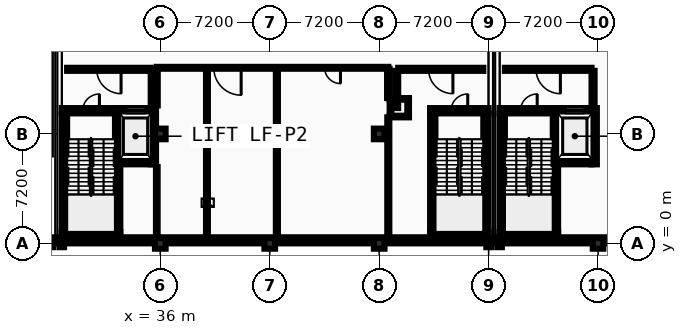
"""IFC4 building model, lengths in metres.
Left out: names, types, materials, properties, quantities, classifications, styles, units other than length and angle.
Written with IfcOpenShell. Run it as: python <this file> out.ifc"""

import sys

from ifc_helpers import new_model, si_unit, direction, frame, frame_2d, origin, origin_2d, place, context, subcontext, project, spatial, rectangle, i_section, extrude, element, fill, save


model = new_model("IFC4")
c1 = context("Model", 3, precision=1e-05, world=origin(), true_north=direction((0.0, 1.0)))
c2 = subcontext(c1, "Body", "Model", "MODEL_VIEW")
j1 = project(units=[si_unit("LENGTHUNIT", "METRE"), si_unit("PLANEANGLEUNIT", "RADIAN")], contexts=[c1])
p1 = place(None, origin())
s1 = spatial("IfcSite", under=j1, at=p1, CompositionType="ELEMENT")
p2 = place(p1, origin())
s2 = spatial("IfcBuilding", under=s1, at=p2, CompositionType="ELEMENT")
p3 = place(p2, frame((0.0, 0.0, -4.8)))
s3 = spatial("IfcBuildingStorey", under=s2, at=p3, CompositionType="ELEMENT", Elevation=-4.8)
for number, where, z_axis, x_axis in (
    (1, (28.8, 0.0, 0.0), (0.0, 0.0, 1.0), (1.0, 0.0, 0.0)),
    (2, (29.52, 0.0, 0.0), (0.0, 0.0, 1.0), (1.0, 0.0, 0.0)),
):
    element("IfcColumn", number, at=place(p3, frame(where, z_axis=z_axis, x_axis=x_axis)), inside=s3, PredefinedType="COLUMN", context=c2, shape_type="SweptSolid", body=[
        extrude(i_section(OverallWidth=0.3, OverallDepth=0.5, WebThickness=0.014, FlangeThickness=0.028, FilletRadius=0.027, at=origin_2d()), origin(), (0.0, 0.0, 1.0), 4.8),
    ])
for number, where, z_axis, x_axis in (
    (3, (36.0, 0.0, 0.0), (0.0, 0.0, 1.0), (1.0, 0.0, 0.0)),
    (4, (36.0, 7.2, 0.0), (0.0, 0.0, 1.0), (1.0, 0.0, 0.0)),
    (5, (43.2, 0.0, 0.0), (0.0, 0.0, 1.0), (1.0, 0.0, 0.0)),
    (6, (43.2, 7.2, 0.0), (0.0, 0.0, 1.0), (1.0, 0.0, 0.0)),
    (7, (50.4, 0.0, 0.0), (0.0, 0.0, 1.0), (1.0, 0.0, 0.0)),
    (8, (50.4, 7.2, 0.0), (0.0, 0.0, 1.0), (1.0, 0.0, 0.0)),
):
    element("IfcColumn", number, at=place(p3, frame(where, z_axis=z_axis, x_axis=x_axis)), inside=s3, PredefinedType="COLUMN", context=c2, shape_type="SweptSolid", body=[
        extrude(rectangle(XDim=0.7, YDim=0.7, at=origin_2d()), origin(), (0.0, 0.0, 1.0), 4.8),
    ])
for number, where, z_axis, x_axis in (
    (9, (57.6, 0.0, 0.0), (0.0, 0.0, 1.0), (1.0, 0.0, 0.0)),
    (10, (58.32, 0.0, 0.0), (0.0, 0.0, 1.0), (1.0, 0.0, 0.0)),
):
    element("IfcColumn", number, at=place(p3, frame(where, z_axis=z_axis, x_axis=x_axis)), inside=s3, PredefinedType="COLUMN", context=c2, shape_type="SweptSolid", body=[
        extrude(i_section(OverallWidth=0.3, OverallDepth=0.5, WebThickness=0.014, FlangeThickness=0.028, FilletRadius=0.027, at=origin_2d()), origin(), (0.0, 0.0, 1.0), 4.8),
    ])
p4 = place(p3, frame((64.8, 0.0, 0.0), z_axis=(0.0, 0.0, 1.0), x_axis=(1.0, 0.0, 0.0)))
e11 = element("IfcColumn", 11, at=p4, inside=s3, PredefinedType="COLUMN", context=c2, shape_type="SweptSolid", body=[
    extrude(rectangle(XDim=0.7, YDim=0.7, at=origin_2d()), origin(), (0.0, 0.0, 1.0), 4.8),
])
p5 = place(p3, frame((0.0, 0.2, 0.0), z_axis=(0.0, 0.0, 1.0), x_axis=(1.0, 0.0, 0.0)))
e12 = element("IfcWall", 12, at=p5, inside=s3, PredefinedType="USERDEFINED", context=c2, shape_type="SweptSolid", body=[
    extrude(rectangle(XDim=86.4, YDim=0.4, at=frame_2d((43.2, 0.0))), origin(), (0.0, 0.0, 1.0), 4.545),
])
p6 = place(p3, frame((29.52, 0.575, 0.0), z_axis=(0.0, 0.0, 1.0), x_axis=(1.0, 0.0, 0.0)))
e13 = element("IfcWall", 13, at=p6, inside=s3, PredefinedType="SHEAR", context=c2, shape_type="SweptSolid", body=[
    extrude(rectangle(XDim=3.85, YDim=0.35, at=frame_2d((1.925, 0.0))), origin(), (0.0, 0.0, 1.0), 4.545),
])
p7 = place(p3, frame((29.52, 8.725, 0.0), z_axis=(0.0, 0.0, 1.0), x_axis=(1.0, 0.0, 0.0)))
e14 = element("IfcWall", 14, at=p7, inside=s3, PredefinedType="SHEAR", context=c2, shape_type="SweptSolid", body=[
    extrude(rectangle(XDim=3.85, YDim=0.35, at=frame_2d((1.925, 0.0))), origin(), (0.0, 0.0, 1.0), 4.545),
])
p8 = place(p7, frame((1.375, 0.0, 0.0)))
e15 = element("IfcOpeningElement", 15, at=p8, cuts=e14, PredefinedType="OPENING", context=c2, shape_type="SweptSolid", body=[
    extrude(rectangle(XDim=1.1, YDim=2.15, at=frame_2d((0.55, 1.075))), frame((0.0, 0.185, 0.0), z_axis=(0.0, -1.0, 0.0), x_axis=(1.0, 0.0, 0.0)), (0.0, 0.0, 1.0), 0.37),
])
for number, where, z_axis, x_axis in (
    (16, (29.695, 0.75, 0.0), (0.0, 0.0, 1.0), (0.0, 1.0, 0.0)),
    (17, (33.195, 0.75, 0.0), (0.0, 0.0, 1.0), (0.0, 1.0, 0.0)),
):
    element("IfcWall", number, at=place(p3, frame(where, z_axis=z_axis, x_axis=x_axis)), inside=s3, PredefinedType="SHEAR", context=c2, shape_type="SweptSolid", body=[
        extrude(rectangle(XDim=7.8, YDim=0.35, at=frame_2d((3.9, 0.0))), origin(), (0.0, 0.0, 1.0), 4.545),
    ])
p9 = place(p3, frame((33.37, 5.375, 0.0), z_axis=(0.0, 0.0, 1.0), x_axis=(1.0, 0.0, 0.0)))
e18 = element("IfcWall", 18, at=p9, inside=s3, PredefinedType="SHEAR", context=c2, shape_type="SweptSolid", body=[
    extrude(rectangle(XDim=2.0, YDim=0.35, at=frame_2d((1.0, 0.0))), origin(), (0.0, 0.0, 1.0), 4.545),
])
p10 = place(p3, frame((33.37, 8.725, 0.0), z_axis=(0.0, 0.0, 1.0), x_axis=(1.0, 0.0, 0.0)))
e19 = element("IfcWall", 19, at=p10, inside=s3, PredefinedType="SHEAR", context=c2, shape_type="SweptSolid", body=[
    extrude(rectangle(XDim=2.0, YDim=0.35, at=frame_2d((1.0, 0.0))), origin(), (0.0, 0.0, 1.0), 4.545),
])
p11 = place(p10, frame((0.4, 0.0, 0.0)))
e20 = element("IfcOpeningElement", 20, at=p11, cuts=e19, PredefinedType="OPENING", context=c2, shape_type="SweptSolid", body=[
    extrude(rectangle(XDim=1.2, YDim=2.2, at=frame_2d((0.6, 1.1))), frame((0.0, 0.185, 0.0), z_axis=(0.0, -1.0, 0.0), x_axis=(1.0, 0.0, 0.0)), (0.0, 0.0, 1.0), 0.37),
])
p12 = place(p3, frame((35.545, 5.2, 0.0), z_axis=(0.0, 0.0, 1.0), x_axis=(0.0, 1.0, 0.0)))
e21 = element("IfcWall", 21, at=p12, inside=s3, PredefinedType="SHEAR", context=c2, shape_type="SweptSolid", body=[
    extrude(rectangle(XDim=3.7, YDim=0.35, at=frame_2d((1.85, 0.0))), origin(), (0.0, 0.0, 1.0), 4.545),
])
p13 = place(p3, frame((29.87, 11.45, 0.0), z_axis=(0.0, 0.0, 1.0), x_axis=(1.0, 0.0, 0.0)))
e22 = element("IfcWall", 22, at=p13, inside=s3, PredefinedType="PARTITIONING", context=c2, shape_type="SweptSolid", body=[
    extrude(rectangle(XDim=5.5, YDim=0.2, at=frame_2d((2.75, 0.0))), origin(), (0.0, 0.0, 1.0), 4.545),
])
p14 = place(p13, frame((1.95, 0.0, 0.0)))
e23 = element("IfcOpeningElement", 23, at=p14, cuts=e22, PredefinedType="OPENING", context=c2, shape_type="SweptSolid", body=[
    extrude(rectangle(XDim=1.6, YDim=2.2, at=frame_2d((0.8, 1.1))), frame((0.0, 0.11, 0.0), z_axis=(0.0, -1.0, 0.0), x_axis=(1.0, 0.0, 0.0)), (0.0, 0.0, 1.0), 0.22),
])
p15 = place(p3, frame((35.47, 8.9, 0.0), z_axis=(0.0, 0.0, 1.0), x_axis=(0.0, 1.0, 0.0)))
e24 = element("IfcWall", 24, at=p15, inside=s3, PredefinedType="PARTITIONING", context=c2, shape_type="SweptSolid", body=[
    extrude(rectangle(XDim=2.45, YDim=0.2, at=frame_2d((1.225, 0.0))), origin(), (0.0, 0.0, 1.0), 4.545),
])
p16 = place(p3, frame((53.75, 0.575, 0.0), z_axis=(0.0, 0.0, 1.0), x_axis=(1.0, 0.0, 0.0)))
e25 = element("IfcWall", 25, at=p16, inside=s3, PredefinedType="SHEAR", context=c2, shape_type="SweptSolid", body=[
    extrude(rectangle(XDim=3.85, YDim=0.35, at=frame_2d((1.925, 0.0))), origin(), (0.0, 0.0, 1.0), 4.545),
])
p17 = place(p3, frame((53.75, 8.725, 0.0), z_axis=(0.0, 0.0, 1.0), x_axis=(1.0, 0.0, 0.0)))
e26 = element("IfcWall", 26, at=p17, inside=s3, PredefinedType="SHEAR", context=c2, shape_type="SweptSolid", body=[
    extrude(rectangle(XDim=3.85, YDim=0.35, at=frame_2d((1.925, 0.0))), origin(), (0.0, 0.0, 1.0), 4.545),
])
p18 = place(p17, frame((1.375, 0.0, 0.0)))
e27 = element("IfcOpeningElement", 27, at=p18, cuts=e26, PredefinedType="OPENING", context=c2, shape_type="SweptSolid", body=[
    extrude(rectangle(XDim=1.1, YDim=2.15, at=frame_2d((0.55, 1.075))), frame((0.0, 0.185, 0.0), z_axis=(0.0, -1.0, 0.0), x_axis=(1.0, 0.0, 0.0)), (0.0, 0.0, 1.0), 0.37),
])
for number, where, z_axis, x_axis in (
    (28, (53.925, 0.75, 0.0), (0.0, 0.0, 1.0), (0.0, 1.0, 0.0)),
    (29, (57.425, 0.75, 0.0), (0.0, 0.0, 1.0), (0.0, 1.0, 0.0)),
):
    element("IfcWall", number, at=place(p3, frame(where, z_axis=z_axis, x_axis=x_axis)), inside=s3, PredefinedType="SHEAR", context=c2, shape_type="SweptSolid", body=[
        extrude(rectangle(XDim=7.8, YDim=0.35, at=frame_2d((3.9, 0.0))), origin(), (0.0, 0.0, 1.0), 4.545),
    ])
p19 = place(p3, frame((51.65, 11.45, 0.0), z_axis=(0.0, 0.0, 1.0), x_axis=(1.0, 0.0, 0.0)))
e30 = element("IfcWall", 30, at=p19, inside=s3, PredefinedType="PARTITIONING", context=c2, shape_type="SweptSolid", body=[
    extrude(rectangle(XDim=5.6, YDim=0.2, at=frame_2d((2.8, 0.0))), origin(), (0.0, 0.0, 1.0), 4.545),
])
p20 = place(p19, frame((2.0, 0.0, 0.0)))
e31 = element("IfcOpeningElement", 31, at=p20, cuts=e30, PredefinedType="OPENING", context=c2, shape_type="SweptSolid", body=[
    extrude(rectangle(XDim=1.6, YDim=2.2, at=frame_2d((0.8, 1.1))), frame((0.0, 0.11, 0.0), z_axis=(0.0, -1.0, 0.0), x_axis=(1.0, 0.0, 0.0)), (0.0, 0.0, 1.0), 0.22),
])
p21 = place(p3, frame((51.55, 8.9, 0.0), z_axis=(0.0, 0.0, 1.0), x_axis=(0.0, 1.0, 0.0)))
e32 = element("IfcWall", 32, at=p21, inside=s3, PredefinedType="PARTITIONING", context=c2, shape_type="SweptSolid", body=[
    extrude(rectangle(XDim=2.45, YDim=0.2, at=frame_2d((1.225, 0.0))), origin(), (0.0, 0.0, 1.0), 4.545),
])
p22 = place(p3, frame((58.32, 0.575, 0.0), z_axis=(0.0, 0.0, 1.0), x_axis=(1.0, 0.0, 0.0)))
e33 = element("IfcWall", 33, at=p22, inside=s3, PredefinedType="SHEAR", context=c2, shape_type="SweptSolid", body=[
    extrude(rectangle(XDim=3.85, YDim=0.35, at=frame_2d((1.925, 0.0))), origin(), (0.0, 0.0, 1.0), 4.545),
])
p23 = place(p3, frame((58.32, 8.725, 0.0), z_axis=(0.0, 0.0, 1.0), x_axis=(1.0, 0.0, 0.0)))
e34 = element("IfcWall", 34, at=p23, inside=s3, PredefinedType="SHEAR", context=c2, shape_type="SweptSolid", body=[
    extrude(rectangle(XDim=3.85, YDim=0.35, at=frame_2d((1.925, 0.0))), origin(), (0.0, 0.0, 1.0), 4.545),
])
p24 = place(p23, frame((1.375, 0.0, 0.0)))
e35 = element("IfcOpeningElement", 35, at=p24, cuts=e34, PredefinedType="OPENING", context=c2, shape_type="SweptSolid", body=[
    extrude(rectangle(XDim=1.1, YDim=2.15, at=frame_2d((0.55, 1.075))), frame((0.0, 0.185, 0.0), z_axis=(0.0, -1.0, 0.0), x_axis=(1.0, 0.0, 0.0)), (0.0, 0.0, 1.0), 0.37),
])
for number, where, z_axis, x_axis in (
    (36, (58.495, 0.75, 0.0), (0.0, 0.0, 1.0), (0.0, 1.0, 0.0)),
    (37, (61.995, 0.75, 0.0), (0.0, 0.0, 1.0), (0.0, 1.0, 0.0)),
):
    element("IfcWall", number, at=place(p3, frame(where, z_axis=z_axis, x_axis=x_axis)), inside=s3, PredefinedType="SHEAR", context=c2, shape_type="SweptSolid", body=[
        extrude(rectangle(XDim=7.8, YDim=0.35, at=frame_2d((3.9, 0.0))), origin(), (0.0, 0.0, 1.0), 4.545),
    ])
p25 = place(p3, frame((62.17, 5.375, 0.0), z_axis=(0.0, 0.0, 1.0), x_axis=(1.0, 0.0, 0.0)))
e38 = element("IfcWall", 38, at=p25, inside=s3, PredefinedType="SHEAR", context=c2, shape_type="SweptSolid", body=[
    extrude(rectangle(XDim=2.2, YDim=0.35, at=frame_2d((1.1, 0.0))), origin(), (0.0, 0.0, 1.0), 4.545),
])
p26 = place(p3, frame((62.17, 8.725, 0.0), z_axis=(0.0, 0.0, 1.0), x_axis=(1.0, 0.0, 0.0)))
e39 = element("IfcWall", 39, at=p26, inside=s3, PredefinedType="SHEAR", context=c2, shape_type="SweptSolid", body=[
    extrude(rectangle(XDim=2.2, YDim=0.35, at=frame_2d((1.1, 0.0))), origin(), (0.0, 0.0, 1.0), 4.545),
])
p27 = place(p26, frame((0.5, 0.0, 0.0)))
e40 = element("IfcOpeningElement", 40, at=p27, cuts=e39, PredefinedType="OPENING", context=c2, shape_type="SweptSolid", body=[
    extrude(rectangle(XDim=1.2, YDim=2.2, at=frame_2d((0.6, 1.1))), frame((0.0, 0.185, 0.0), z_axis=(0.0, -1.0, 0.0), x_axis=(1.0, 0.0, 0.0)), (0.0, 0.0, 1.0), 0.37),
])
p28 = place(p3, frame((64.545, 5.2, 0.0), z_axis=(0.0, 0.0, 1.0), x_axis=(0.0, 1.0, 0.0)))
e41 = element("IfcWall", 41, at=p28, inside=s3, PredefinedType="SHEAR", context=c2, shape_type="SweptSolid", body=[
    extrude(rectangle(XDim=3.7, YDim=0.35, at=frame_2d((1.85, 0.0))), origin(), (0.0, 0.0, 1.0), 4.545),
])
p29 = place(p3, frame((58.67, 11.45, 0.0), z_axis=(0.0, 0.0, 1.0), x_axis=(1.0, 0.0, 0.0)))
e42 = element("IfcWall", 42, at=p29, inside=s3, PredefinedType="PARTITIONING", context=c2, shape_type="SweptSolid", body=[
    extrude(rectangle(XDim=5.7, YDim=0.2, at=frame_2d((2.85, 0.0))), origin(), (0.0, 0.0, 1.0), 4.545),
])
p30 = place(p29, frame((2.05, 0.0, 0.0)))
e43 = element("IfcOpeningElement", 43, at=p30, cuts=e42, PredefinedType="OPENING", context=c2, shape_type="SweptSolid", body=[
    extrude(rectangle(XDim=1.6, YDim=2.2, at=frame_2d((0.8, 1.1))), frame((0.0, 0.11, 0.0), z_axis=(0.0, -1.0, 0.0), x_axis=(1.0, 0.0, 0.0)), (0.0, 0.0, 1.0), 0.22),
])
p31 = place(p3, frame((64.47, 8.9, 0.0), z_axis=(0.0, 0.0, 1.0), x_axis=(0.0, 1.0, 0.0)))
e44 = element("IfcWall", 44, at=p31, inside=s3, PredefinedType="PARTITIONING", context=c2, shape_type="SweptSolid", body=[
    extrude(rectangle(XDim=2.45, YDim=0.2, at=frame_2d((1.225, 0.0))), origin(), (0.0, 0.0, 1.0), 4.545),
])
for number, where, z_axis, x_axis in (
    (45, (51.09, 8.345, 0.0), (0.0, 0.0, 1.0), (1.0, 0.0, 0.0)),
    (46, (51.09, 9.505, 0.0), (0.0, 0.0, 1.0), (1.0, 0.0, 0.0)),
):
    element("IfcWall", number, at=place(p3, frame(where, z_axis=z_axis, x_axis=x_axis)), inside=s3, PredefinedType="PARTITIONING", context=c2, shape_type="SweptSolid", body=[
        extrude(rectangle(XDim=1.27, YDim=0.11, at=frame_2d((0.635, 0.0))), origin(), (0.0, 0.0, 1.0), 4.54),
    ])
for number, where, z_axis, x_axis in (
    (47, (51.145, 8.4, 0.0), (0.0, 0.0, 1.0), (0.0, 1.0, 0.0)),
    (48, (52.305, 8.4, 0.0), (0.0, 0.0, 1.0), (0.0, 1.0, 0.0)),
):
    element("IfcWall", number, at=place(p3, frame(where, z_axis=z_axis, x_axis=x_axis)), inside=s3, PredefinedType="PARTITIONING", context=c2, shape_type="SweptSolid", body=[
        extrude(rectangle(XDim=1.05, YDim=0.11, at=frame_2d((0.525, 0.0))), origin(), (0.0, 0.0, 1.0), 4.54),
    ])
p32 = place(p3, frame((35.77, 11.55, 0.0), z_axis=(0.0, 0.0, 1.0), x_axis=(1.0, 0.0, 0.0)))
e49 = element("IfcWall", 49, at=p32, inside=s3, PredefinedType="PARTITIONING", context=c2, shape_type="SweptSolid", body=[
    extrude(rectangle(XDim=15.23, YDim=0.125, at=frame_2d((7.615, 0.0))), origin(), (0.0, 0.0, 1.0), 4.545),
])
p33 = place(p32, frame((1.85, 0.0, 0.0)))
e50 = element("IfcOpeningElement", 50, at=p33, cuts=e49, PredefinedType="OPENING", context=c2, shape_type="SweptSolid", body=[
    extrude(rectangle(XDim=1.0, YDim=2.1, at=frame_2d((0.5, 1.05))), frame((0.0, 0.073, 0.0), z_axis=(0.0, -1.0, 0.0), x_axis=(1.0, 0.0, 0.0)), (0.0, 0.0, 1.0), 0.145),
])
p34 = place(p32, frame((3.75, 0.0, 0.0)))
e51 = element("IfcOpeningElement", 51, at=p34, cuts=e49, PredefinedType="OPENING", context=c2, shape_type="SweptSolid", body=[
    extrude(rectangle(XDim=1.8, YDim=2.3, at=frame_2d((0.9, 1.15))), frame((0.0, 0.073, 0.0), z_axis=(0.0, -1.0, 0.0), x_axis=(1.0, 0.0, 0.0)), (0.0, 0.0, 1.0), 0.145),
])
p35 = place(p32, frame((11.047, 0.0, 0.0)))
e52 = element("IfcOpeningElement", 52, at=p35, cuts=e49, PredefinedType="OPENING", context=c2, shape_type="SweptSolid", body=[
    extrude(rectangle(XDim=1.036, YDim=2.04, at=frame_2d((0.518, 1.02))), frame((0.0, 0.073, 0.0), z_axis=(0.0, -1.0, 0.0), x_axis=(1.0, 0.0, 0.0)), (0.0, 0.0, 1.0), 0.145),
])
p36 = place(p3, frame((35.77, 0.4, 0.0), z_axis=(0.0, 0.0, 1.0), x_axis=(0.0, 1.0, 0.0)))
e53 = element("IfcWall", 53, at=p36, inside=s3, PredefinedType="PARTITIONING", context=c2, shape_type="SweptSolid", body=[
    extrude(rectangle(XDim=4.625, YDim=0.11, at=frame_2d((2.312, 0.0))), origin(), (0.0, 0.0, 1.0), 4.245),
])
p37 = place(p3, frame((35.77, 9.075, 0.0), z_axis=(0.0, 0.0, 1.0), x_axis=(0.0, 1.0, 0.0)))
e54 = element("IfcWall", 54, at=p37, inside=s3, PredefinedType="PARTITIONING", context=c2, shape_type="SweptSolid", body=[
    extrude(rectangle(XDim=2.413, YDim=0.125, at=frame_2d((1.206, 0.0))), origin(), (0.0, 0.0, 1.0), 4.245),
])
p38 = place(p3, frame((39.07, 0.4, 0.0), z_axis=(0.0, 0.0, 1.0), x_axis=(0.0, 1.0, 0.0)))
e55 = element("IfcWall", 55, at=p38, inside=s3, PredefinedType="PARTITIONING", context=c2, shape_type="SweptSolid", body=[
    extrude(rectangle(XDim=11.088, YDim=0.125, at=frame_2d((5.544, 0.0))), origin(), (0.0, 0.0, 1.0), 4.545),
])
p39 = place(p3, frame((43.67, 0.4, 0.0), z_axis=(0.0, 0.0, 1.0), x_axis=(0.0, 1.0, 0.0)))
e56 = element("IfcWall", 56, at=p39, inside=s3, PredefinedType="PARTITIONING", context=c2, shape_type="SweptSolid", body=[
    extrude(rectangle(XDim=11.088, YDim=0.135, at=frame_2d((5.544, 0.0))), origin(), (0.0, 0.0, 1.0), 4.545),
])
p40 = place(p3, frame((51.0, 0.4, 0.0), z_axis=(0.0, 0.0, 1.0), x_axis=(0.0, 1.0, 0.0)))
e57 = element("IfcWall", 57, at=p40, inside=s3, PredefinedType="PARTITIONING", context=c2, shape_type="SweptSolid", body=[
    extrude(rectangle(XDim=7.89, YDim=0.135, at=frame_2d((3.945, 0.0))), origin(), (0.0, 0.0, 1.0), 4.545),
])
p41 = place(p3, frame((51.0, 9.56, 0.0), z_axis=(0.0, 0.0, 1.0), x_axis=(0.0, 1.0, 0.0)))
e58 = element("IfcWall", 58, at=p41, inside=s3, PredefinedType="PARTITIONING", context=c2, shape_type="SweptSolid", body=[
    extrude(rectangle(XDim=1.927, YDim=0.16, at=frame_2d((0.964, 0.0))), origin(), (0.0, 0.0, 1.0), 4.545),
])
p42 = place(p8, frame((1.1, 0.0, 0.0), z_axis=(0.0, 0.0, 1.0), x_axis=(-1.0, 0.0, 0.0)))
e59 = element("IfcDoor", 59, at=p42, inside=s3, OperationType="SINGLE_SWING_RIGHT", PredefinedType="DOOR", context=c2, shape_type="SweptSolid", body=[
    extrude(rectangle(XDim=1.1, YDim=2.15, at=frame_2d((0.55, 1.075))), frame((0.0, 0.025, 0.0), z_axis=(0.0, -1.0, 0.0), x_axis=(1.0, 0.0, 0.0)), (0.0, 0.0, 1.0), 0.05),
])
fill(e15, e59)
p43 = place(p11, origin())
e60 = element("IfcDoor", 60, at=p43, inside=s3, OperationType="SLIDING_TO_RIGHT", PredefinedType="DOOR", context=c2, shape_type="SweptSolid", body=[
    extrude(rectangle(XDim=1.2, YDim=2.2, at=frame_2d((0.6, 1.1))), frame((0.0, 0.025, 0.0), z_axis=(0.0, -1.0, 0.0), x_axis=(1.0, 0.0, 0.0)), (0.0, 0.0, 1.0), 0.05),
])
fill(e20, e60)
p44 = place(p14, origin())
e61 = element("IfcDoor", 61, at=p44, inside=s3, OperationType="DOUBLE_DOOR_SINGLE_SWING", PredefinedType="DOOR", context=c2, shape_type="SweptSolid", body=[
    extrude(rectangle(XDim=1.6, YDim=2.2, at=frame_2d((0.8, 1.1))), frame((0.0, 0.025, 0.0), z_axis=(0.0, -1.0, 0.0), x_axis=(1.0, 0.0, 0.0)), (0.0, 0.0, 1.0), 0.05),
])
fill(e23, e61)
p45 = place(p18, frame((1.1, 0.0, 0.0), z_axis=(0.0, 0.0, 1.0), x_axis=(-1.0, 0.0, 0.0)))
e62 = element("IfcDoor", 62, at=p45, inside=s3, OperationType="SINGLE_SWING_RIGHT", PredefinedType="DOOR", context=c2, shape_type="SweptSolid", body=[
    extrude(rectangle(XDim=1.1, YDim=2.15, at=frame_2d((0.55, 1.075))), frame((0.0, 0.025, 0.0), z_axis=(0.0, -1.0, 0.0), x_axis=(1.0, 0.0, 0.0)), (0.0, 0.0, 1.0), 0.05),
])
fill(e27, e62)
p46 = place(p20, origin())
e63 = element("IfcDoor", 63, at=p46, inside=s3, OperationType="DOUBLE_DOOR_SINGLE_SWING", PredefinedType="DOOR", context=c2, shape_type="SweptSolid", body=[
    extrude(rectangle(XDim=1.6, YDim=2.2, at=frame_2d((0.8, 1.1))), frame((0.0, 0.025, 0.0), z_axis=(0.0, -1.0, 0.0), x_axis=(1.0, 0.0, 0.0)), (0.0, 0.0, 1.0), 0.05),
])
fill(e31, e63)
p47 = place(p24, frame((1.1, 0.0, 0.0), z_axis=(0.0, 0.0, 1.0), x_axis=(-1.0, 0.0, 0.0)))
e64 = element("IfcDoor", 64, at=p47, inside=s3, OperationType="SINGLE_SWING_RIGHT", PredefinedType="DOOR", context=c2, shape_type="SweptSolid", body=[
    extrude(rectangle(XDim=1.1, YDim=2.15, at=frame_2d((0.55, 1.075))), frame((0.0, 0.025, 0.0), z_axis=(0.0, -1.0, 0.0), x_axis=(1.0, 0.0, 0.0)), (0.0, 0.0, 1.0), 0.05),
])
fill(e35, e64)
p48 = place(p27, origin())
e65 = element("IfcDoor", 65, at=p48, inside=s3, OperationType="SLIDING_TO_RIGHT", PredefinedType="DOOR", context=c2, shape_type="SweptSolid", body=[
    extrude(rectangle(XDim=1.2, YDim=2.2, at=frame_2d((0.6, 1.1))), frame((0.0, 0.025, 0.0), z_axis=(0.0, -1.0, 0.0), x_axis=(1.0, 0.0, 0.0)), (0.0, 0.0, 1.0), 0.05),
])
fill(e40, e65)
p49 = place(p30, origin())
e66 = element("IfcDoor", 66, at=p49, inside=s3, OperationType="DOUBLE_DOOR_SINGLE_SWING", PredefinedType="DOOR", context=c2, shape_type="SweptSolid", body=[
    extrude(rectangle(XDim=1.6, YDim=2.2, at=frame_2d((0.8, 1.1))), frame((0.0, 0.025, 0.0), z_axis=(0.0, -1.0, 0.0), x_axis=(1.0, 0.0, 0.0)), (0.0, 0.0, 1.0), 0.05),
])
fill(e43, e66)
p50 = place(p33, origin())
e67 = element("IfcDoor", 67, at=p50, inside=s3, OperationType="SLIDING_TO_LEFT", PredefinedType="DOOR", context=c2, shape_type="SweptSolid", body=[
    extrude(rectangle(XDim=1.0, YDim=2.1, at=frame_2d((0.5, 1.05))), frame((0.0, 0.025, 0.0), z_axis=(0.0, -1.0, 0.0), x_axis=(1.0, 0.0, 0.0)), (0.0, 0.0, 1.0), 0.05),
])
fill(e50, e67)
p51 = place(p34, origin())
e68 = element("IfcDoor", 68, at=p51, inside=s3, OperationType="DOUBLE_DOOR_SINGLE_SWING", PredefinedType="DOOR", context=c2, shape_type="SweptSolid", body=[
    extrude(rectangle(XDim=1.8, YDim=2.3, at=frame_2d((0.9, 1.15))), frame((0.0, 0.025, 0.0), z_axis=(0.0, -1.0, 0.0), x_axis=(1.0, 0.0, 0.0)), (0.0, 0.0, 1.0), 0.05),
])
fill(e51, e68)
p52 = place(p35, origin())
e69 = element("IfcDoor", 69, at=p52, inside=s3, OperationType="SINGLE_SWING_RIGHT", PredefinedType="DOOR", context=c2, shape_type="SweptSolid", body=[
    extrude(rectangle(XDim=1.036, YDim=2.04, at=frame_2d((0.518, 1.02))), frame((0.0, 0.025, 0.0), z_axis=(0.0, -1.0, 0.0), x_axis=(1.0, 0.0, 0.0)), (0.0, 0.0, 1.0), 0.05),
])
fill(e52, e69)
save(model, sys.argv[1])
